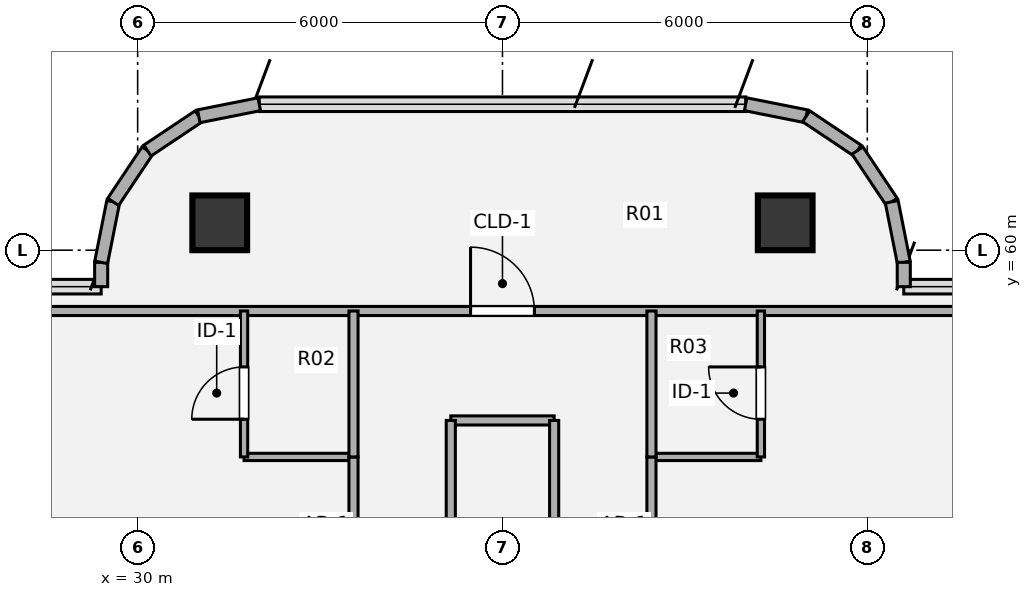
"""IFC4 building model, lengths in metres.
Left out: names, types, materials, properties, quantities, classifications, styles, units other than length and angle.
Written with IfcOpenShell. Run it as: python <this file> out.ifc"""

import sys

from ifc_helpers import new_model, si_unit, direction, frame, frame_2d, origin, origin_2d, place, context, subcontext, project, spatial, rectangle, hollow_circle, extrude, source, transform, mapped, element, fill, save


model = new_model("IFC4")
c1 = context("Model", 3, precision=1e-05, world=origin(), true_north=direction((0.0, 1.0)))
c2 = subcontext(c1, "Body", "Model", "MODEL_VIEW")
j1 = project(units=[si_unit("LENGTHUNIT", "METRE"), si_unit("PLANEANGLEUNIT", "RADIAN")], contexts=[c1])
p1 = place(None, origin())
s1 = spatial("IfcSite", under=j1, at=p1, CompositionType="ELEMENT")
p2 = place(p1, origin())
s2 = spatial("IfcBuilding", under=s1, at=p2, CompositionType="ELEMENT")
p3 = place(p2, frame((0.0, 0.0, 223.02)))
s3 = spatial("IfcBuildingStorey", under=s2, at=p3, CompositionType="ELEMENT", Elevation=223.02)
m1 = source(origin(), c2, "Body", "SweptSolid", [
    extrude(hollow_circle(Radius=0.45, WallThickness=0.032, at=origin_2d()), origin(), (0.0, 0.0, 1.0), 3.78),
])
for number, where, z_axis, x_axis in (
    (1, (31.35, 60.45, 0.0), (0.0, 0.0, 1.0), (1.0, 0.0, 0.0)),
    (2, (40.65, 60.45, 0.0), (0.0, 0.0, 1.0), (1.0, 0.0, 0.0)),
):
    element("IfcColumn", number, at=place(p3, frame(where, z_axis=z_axis, x_axis=x_axis)), inside=s3, PredefinedType="COLUMN", context=c2, shape_type="MappedRepresentation", body=[
        mapped(m1, transform((0.0, 0.0, 0.0), x_axis=(1.0, 0.0, 0.0), y_axis=(0.0, 1.0, 0.0), z_axis=(0.0, 0.0, 1.0), scale=1.0)),
    ])
p4 = place(p3, frame((29.4, 59.4, 0.0), z_axis=(0.0, 0.0, 1.0), x_axis=(0.0, 1.0, 0.0)))
e3 = element("IfcWall", 3, at=p4, inside=s3, PredefinedType="SOLIDWALL", context=c2, shape_type="SweptSolid", body=[
    extrude(rectangle(XDim=0.4, YDim=0.215, at=frame_2d((0.2, 0.0))), origin(), (0.0, 0.0, 1.0), 3.53),
])
p5 = place(p3, frame((29.4, 59.8, 0.0), z_axis=(0.0, 0.0, 1.0), x_axis=(0.195190360752, 0.980765376158, 0.0)))
e4 = element("IfcWall", 4, at=p5, inside=s3, PredefinedType="SOLIDWALL", context=c2, shape_type="SweptSolid", body=[
    extrude(rectangle(XDim=1.014, YDim=0.215, at=frame_2d((0.507, 0.0))), origin(), (0.0, 0.0, 1.0), 3.53),
])
p6 = place(p3, frame((29.598, 60.795, 0.0), z_axis=(0.0, 0.0, 1.0), x_axis=(0.555643898837, 0.831420385657, 0.0)))
e5 = element("IfcWall", 5, at=p6, inside=s3, PredefinedType="SOLIDWALL", context=c2, shape_type="SweptSolid", body=[
    extrude(rectangle(XDim=1.015, YDim=0.215, at=frame_2d((0.507, 0.0))), origin(), (0.0, 0.0, 1.0), 3.53),
])
p7 = place(p3, frame((30.162, 61.638, 0.0), z_axis=(0.0, 0.0, 1.0), x_axis=(0.831346067305, 0.555755086685, 0.0)))
e6 = element("IfcWall", 6, at=p7, inside=s3, PredefinedType="SOLIDWALL", context=c2, shape_type="SweptSolid", body=[
    extrude(rectangle(XDim=1.014, YDim=0.215, at=frame_2d((0.507, 0.0))), origin(), (0.0, 0.0, 1.0), 3.53),
])
for number, where, z_axis, x_axis in (
    (7, (31.005, 62.202, 0.0), (0.0, 0.0, 1.0), (0.981, 0.195, 0.0)),
    (8, (40.0, 62.4, 0.0), (0.0, 0.0, 1.0), (0.981, -0.195, 0.0)),
):
    element("IfcWall", number, at=place(p3, frame(where, z_axis=z_axis, x_axis=x_axis)), inside=s3, PredefinedType="SOLIDWALL", context=c2, shape_type="SweptSolid", body=[
        extrude(rectangle(XDim=1.015, YDim=0.215, at=frame_2d((0.507, 0.0))), origin(), (0.0, 0.0, 1.0), 3.53),
    ])
p8 = place(p3, frame((40.995, 62.202, 0.0), z_axis=(0.0, 0.0, 1.0), x_axis=(0.831346067305, -0.555755086685, 0.0)))
e9 = element("IfcWall", 9, at=p8, inside=s3, PredefinedType="SOLIDWALL", context=c2, shape_type="SweptSolid", body=[
    extrude(rectangle(XDim=1.014, YDim=0.215, at=frame_2d((0.507, 0.0))), origin(), (0.0, 0.0, 1.0), 3.53),
])
p9 = place(p3, frame((41.838, 61.638, 0.0), z_axis=(0.0, 0.0, 1.0), x_axis=(0.555643898837, -0.831420385657, 0.0)))
e10 = element("IfcWall", 10, at=p9, inside=s3, PredefinedType="SOLIDWALL", context=c2, shape_type="SweptSolid", body=[
    extrude(rectangle(XDim=1.015, YDim=0.215, at=frame_2d((0.507, 0.0))), origin(), (0.0, 0.0, 1.0), 3.53),
])
p10 = place(p3, frame((42.402, 60.795, 0.0), z_axis=(0.0, 0.0, 1.0), x_axis=(0.195190360752, -0.980765376158, 0.0)))
e11 = element("IfcWall", 11, at=p10, inside=s3, PredefinedType="SOLIDWALL", context=c2, shape_type="SweptSolid", body=[
    extrude(rectangle(XDim=1.014, YDim=0.215, at=frame_2d((0.507, 0.0))), origin(), (0.0, 0.0, 1.0), 3.53),
])
p11 = place(p3, frame((42.6, 59.8, 0.0), z_axis=(0.0, 0.0, 1.0), x_axis=(0.0, -1.0, 0.0)))
e12 = element("IfcWall", 12, at=p11, inside=s3, PredefinedType="SOLIDWALL", context=c2, shape_type="SweptSolid", body=[
    extrude(rectangle(XDim=0.4, YDim=0.215, at=frame_2d((0.2, 0.0))), origin(), (0.0, 0.0, 1.0), 3.53),
])
for number, where, z_axis, x_axis in (
    (13, (31.75, 56.6, 0.0), (0.0, 0.0, 1.0), (1.0, 0.0, 0.0)),
    (14, (38.45, 56.6, 0.0), (0.0, 0.0, 1.0), (1.0, 0.0, 0.0)),
):
    element("IfcWall", number, at=place(p3, frame(where, z_axis=z_axis, x_axis=x_axis)), inside=s3, PredefinedType="PARTITIONING", context=c2, shape_type="SweptSolid", body=[
        extrude(rectangle(XDim=1.8, YDim=0.12, at=frame_2d((0.9, 0.0))), origin(), (0.0, 0.0, 1.0), 3.259),
    ])
p12 = place(p3, frame((35.15, 57.2, 0.0), z_axis=(0.0, 0.0, 1.0), x_axis=(1.0, 0.0, 0.0)))
e15 = element("IfcWall", 15, at=p12, inside=s3, PredefinedType="PARTITIONING", context=c2, shape_type="SweptSolid", body=[
    extrude(rectangle(XDim=1.7, YDim=0.15, at=frame_2d((0.85, 0.0))), origin(), (0.0, 0.0, 1.0), 3.308),
])
p13 = place(p3, frame((27.1, 59.0, 0.0), z_axis=(0.0, 0.0, 1.0), x_axis=(1.0, 0.0, 0.0)))
e16 = element("IfcWall", 16, at=p13, inside=s3, PredefinedType="PARTITIONING", context=c2, shape_type="SweptSolid", body=[
    extrude(rectangle(XDim=17.8, YDim=0.15, at=frame_2d((8.9, 0.0))), origin(), (0.0, 0.0, 1.0), 3.308),
])
p14 = place(p13, frame((8.375, 0.0, 0.0)))
e17 = element("IfcOpeningElement", 17, at=p14, cuts=e16, PredefinedType="OPENING", context=c2, shape_type="SweptSolid", body=[
    extrude(rectangle(XDim=1.05, YDim=2.1, at=origin_2d()), frame((0.525, 0.085, 1.05), z_axis=(0.0, -1.0, 0.0), x_axis=(1.0, 0.0, 0.0)), (0.0, 0.0, 1.0), 0.17),
])
p15 = place(p3, frame((31.75, 56.6, 0.0), z_axis=(0.0, 0.0, 1.0), x_axis=(0.0, 1.0, 0.0)))
e18 = element("IfcWall", 18, at=p15, inside=s3, PredefinedType="PARTITIONING", context=c2, shape_type="SweptSolid", body=[
    extrude(rectangle(XDim=2.4, YDim=0.12, at=frame_2d((1.2, 0.0))), origin(), (0.0, 0.0, 1.0), 3.5),
])
p16 = place(p15, frame((0.62, 0.0, 0.0)))
e19 = element("IfcOpeningElement", 19, at=p16, cuts=e18, PredefinedType="OPENING", context=c2, shape_type="SweptSolid", body=[
    extrude(rectangle(XDim=0.86, YDim=2.1, at=origin_2d()), frame((0.43, 0.07, 1.05), z_axis=(0.0, -1.0, 0.0), x_axis=(1.0, 0.0, 0.0)), (0.0, 0.0, 1.0), 0.14),
])
p17 = place(p3, frame((33.55, 52.352, 0.0), z_axis=(0.0, 0.0, 1.0), x_axis=(0.0, 1.0, 0.0)))
e20 = element("IfcWall", 20, at=p17, inside=s3, PredefinedType="PARTITIONING", context=c2, shape_type="SweptSolid", body=[
    extrude(rectangle(XDim=4.248, YDim=0.15, at=frame_2d((2.124, 0.0))), origin(), (0.0, 0.0, 1.0), 3.5),
])
p18 = place(p17, frame((1.664, 0.0, 0.0)))
e21 = element("IfcOpeningElement", 21, at=p18, cuts=e20, PredefinedType="OPENING", context=c2, shape_type="SweptSolid", body=[
    extrude(rectangle(XDim=0.92, YDim=2.1, at=origin_2d()), frame((0.46, 0.085, 1.05), z_axis=(0.0, -1.0, 0.0), x_axis=(1.0, 0.0, 0.0)), (0.0, 0.0, 1.0), 0.17),
])
p19 = place(p3, frame((33.55, 56.6, 0.0), z_axis=(0.0, 0.0, 1.0), x_axis=(0.0, 1.0, 0.0)))
e22 = element("IfcWall", 22, at=p19, inside=s3, PredefinedType="PARTITIONING", context=c2, shape_type="SweptSolid", body=[
    extrude(rectangle(XDim=2.4, YDim=0.15, at=frame_2d((1.2, 0.0))), origin(), (0.0, 0.0, 1.0), 3.5),
])
p20 = place(p3, frame((35.15, 44.62, 0.0), z_axis=(0.0, 0.0, 1.0), x_axis=(0.0, 1.0, 0.0)))
e23 = element("IfcWall", 23, at=p20, inside=s3, PredefinedType="PARTITIONING", context=c2, shape_type="SweptSolid", body=[
    extrude(rectangle(XDim=12.58, YDim=0.15, at=frame_2d((6.29, 0.0))), origin(), (0.0, 0.0, 1.0), 3.5),
])
p21 = place(p20, frame((5.83, 0.0, 0.0)))
e24 = element("IfcOpeningElement", 24, at=p21, cuts=e23, PredefinedType="OPENING", context=c2, shape_type="SweptSolid", body=[
    extrude(rectangle(XDim=0.86, YDim=2.1, at=origin_2d()), frame((0.43, 0.085, 1.05), z_axis=(0.0, -1.0, 0.0), x_axis=(1.0, 0.0, 0.0)), (0.0, 0.0, 1.0), 0.17),
])
p22 = place(p3, frame((36.85, 44.62, 0.0), z_axis=(0.0, 0.0, 1.0), x_axis=(0.0, 1.0, 0.0)))
e25 = element("IfcWall", 25, at=p22, inside=s3, PredefinedType="PARTITIONING", context=c2, shape_type="SweptSolid", body=[
    extrude(rectangle(XDim=12.58, YDim=0.15, at=frame_2d((6.29, 0.0))), origin(), (0.0, 0.0, 1.0), 3.5),
])
p23 = place(p3, frame((38.45, 52.352, 0.0), z_axis=(0.0, 0.0, 1.0), x_axis=(0.0, 1.0, 0.0)))
e26 = element("IfcWall", 26, at=p23, inside=s3, PredefinedType="PARTITIONING", context=c2, shape_type="SweptSolid", body=[
    extrude(rectangle(XDim=4.248, YDim=0.15, at=frame_2d((2.124, 0.0))), origin(), (0.0, 0.0, 1.0), 3.5),
])
p24 = place(p23, frame((1.664, 0.0, 0.0)))
e27 = element("IfcOpeningElement", 27, at=p24, cuts=e26, PredefinedType="OPENING", context=c2, shape_type="SweptSolid", body=[
    extrude(rectangle(XDim=0.92, YDim=2.1, at=origin_2d()), frame((0.46, 0.085, 1.05), z_axis=(0.0, -1.0, 0.0), x_axis=(1.0, 0.0, 0.0)), (0.0, 0.0, 1.0), 0.17),
])
p25 = place(p3, frame((38.45, 56.6, 0.0), z_axis=(0.0, 0.0, 1.0), x_axis=(0.0, 1.0, 0.0)))
e28 = element("IfcWall", 28, at=p25, inside=s3, PredefinedType="PARTITIONING", context=c2, shape_type="SweptSolid", body=[
    extrude(rectangle(XDim=2.4, YDim=0.15, at=frame_2d((1.2, 0.0))), origin(), (0.0, 0.0, 1.0), 3.5),
])
p26 = place(p3, frame((40.25, 56.6, 0.0), z_axis=(0.0, 0.0, 1.0), x_axis=(0.0, 1.0, 0.0)))
e29 = element("IfcWall", 29, at=p26, inside=s3, PredefinedType="PARTITIONING", context=c2, shape_type="SweptSolid", body=[
    extrude(rectangle(XDim=2.4, YDim=0.12, at=frame_2d((1.2, 0.0))), origin(), (0.0, 0.0, 1.0), 3.5),
])
p27 = place(p26, frame((0.62, 0.0, 0.0)))
e30 = element("IfcOpeningElement", 30, at=p27, cuts=e29, PredefinedType="OPENING", context=c2, shape_type="SweptSolid", body=[
    extrude(rectangle(XDim=0.86, YDim=2.1, at=origin_2d()), frame((0.43, 0.07, 1.05), z_axis=(0.0, -1.0, 0.0), x_axis=(1.0, 0.0, 0.0)), (0.0, 0.0, 1.0), 0.14),
])
m2 = source(origin(), c2, "Body", "SweptSolid", [
    extrude(rectangle(XDim=1.05, YDim=2.1, at=origin_2d()), frame((0.525, 0.025, 1.05), z_axis=(0.0, -1.0, 0.0), x_axis=(1.0, 0.0, 0.0)), (0.0, 0.0, 1.0), 0.05),
])
p28 = place(p14, origin())
e31 = element("IfcDoor", 31, at=p28, inside=s3, OperationType="SINGLE_SWING_LEFT", PredefinedType="DOOR", context=c2, shape_type="MappedRepresentation", body=[
    mapped(m2, transform((0.0, 0.0, 0.0), x_axis=(1.0, 0.0, 0.0), y_axis=(0.0, 1.0, 0.0), z_axis=(0.0, 0.0, 1.0), scale=1.0)),
])
fill(e17, e31)
m3 = source(origin(), c2, "Body", "SweptSolid", [
    extrude(rectangle(XDim=0.86, YDim=2.1, at=origin_2d()), frame((0.43, 0.025, 1.05), z_axis=(0.0, -1.0, 0.0), x_axis=(1.0, 0.0, 0.0)), (0.0, 0.0, 1.0), 0.05),
])
p29 = place(p16, origin())
e32 = element("IfcDoor", 32, at=p29, inside=s3, OperationType="SINGLE_SWING_LEFT", PredefinedType="DOOR", context=c2, shape_type="MappedRepresentation", body=[
    mapped(m3, transform((0.0, 0.0, 0.0), x_axis=(1.0, 0.0, 0.0), y_axis=(0.0, 1.0, 0.0), z_axis=(0.0, 0.0, 1.0), scale=1.0)),
])
fill(e19, e32)
p30 = place(p27, origin())
e33 = element("IfcDoor", 33, at=p30, inside=s3, OperationType="SINGLE_SWING_RIGHT", PredefinedType="DOOR", context=c2, shape_type="MappedRepresentation", body=[
    mapped(m3, transform((0.0, 0.0, 0.0), x_axis=(1.0, 0.0, 0.0), y_axis=(0.0, 1.0, 0.0), z_axis=(0.0, 0.0, 1.0), scale=1.0)),
])
fill(e30, e33)
save(model, sys.argv[1])
